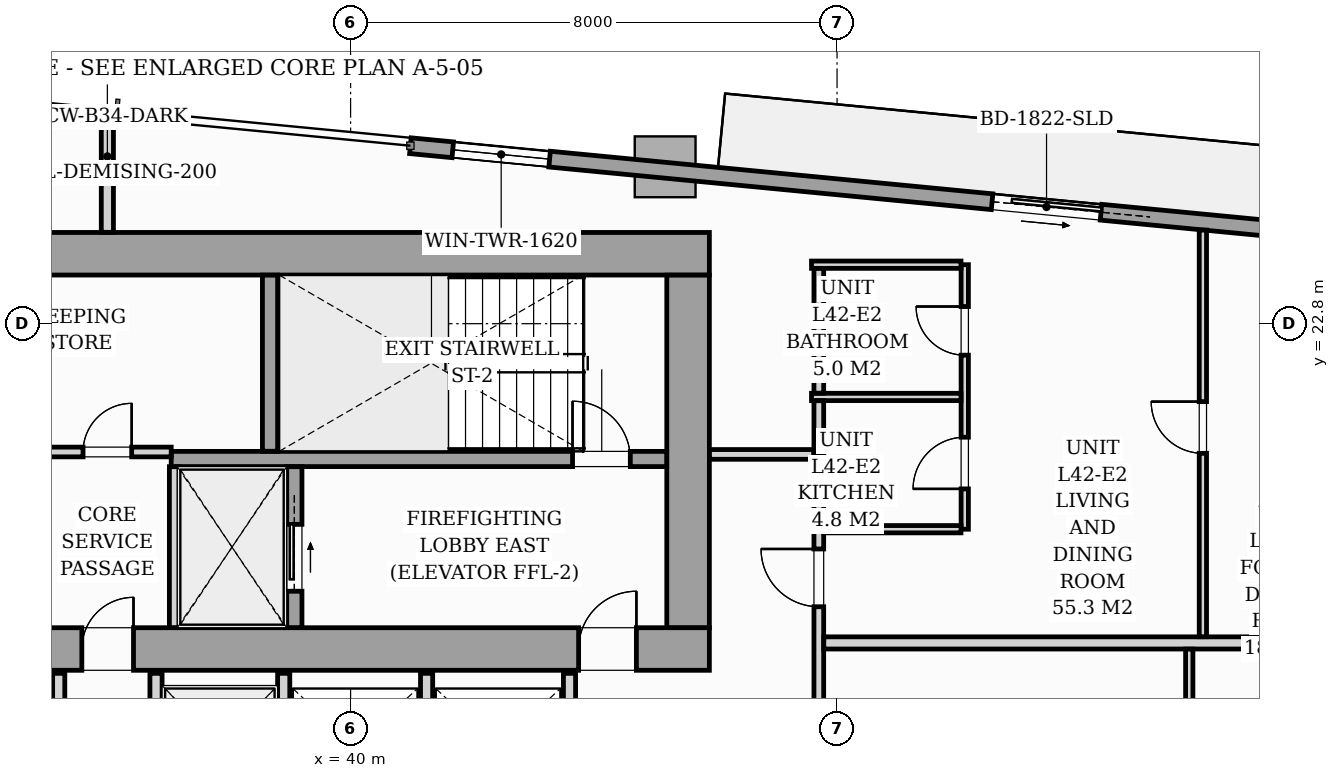
"""IFC4 building model, lengths in metres.
Left out: names, types, materials, properties, quantities, classifications, styles, units other than length and angle.
Written with IfcOpenShell. Run it as: python <this file> out.ifc"""

import sys

from ifc_helpers import new_model, si_unit, direction, frame, frame_2d, origin, origin_2d, place, context, subcontext, project, spatial, rectangle, i_section, extrude, source, transform, mapped, element, fill, save


model = new_model("IFC4")
c1 = context("Model", 3, precision=1e-05, world=origin(), true_north=direction((0.0, 1.0)))
c2 = subcontext(c1, "Body", "Model", "MODEL_VIEW")
j1 = project(units=[si_unit("LENGTHUNIT", "METRE"), si_unit("PLANEANGLEUNIT", "RADIAN")], contexts=[c1])
p1 = place(None, origin())
s1 = spatial("IfcSite", under=j1, at=p1, CompositionType="ELEMENT")
p2 = place(p1, origin())
s2 = spatial("IfcBuilding", under=s1, at=p2, CompositionType="ELEMENT")
p3 = place(p2, frame((0.0, 0.0, 147.0)))
s3 = spatial("IfcBuildingStorey", under=s2, at=p3, CompositionType="ELEMENT", Elevation=147.0)
m1 = source(origin(), c2, "Body", "SweptSolid", [
    extrude(i_section(OverallWidth=0.421, OverallDepth=0.465, WebThickness=0.045, FlangeThickness=0.073, FilletRadius=0.018, at=origin_2d()), origin(), (0.0, 0.0, 1.0), 3.196),
])
for number, where, z_axis, x_axis in (
    (1, (38.88, 17.4, 0.002), (0.0, 0.0, 1.0), (1.0, 0.0, 0.0)),
    (2, (45.6, 17.4, 0.002), (0.0, 0.0, 1.0), (1.0, 0.0, 0.0)),
    (3, (38.88, 24.0, 0.002), (0.0, 0.0, 1.0), (1.0, 0.0, 0.0)),
    (4, (45.6, 24.0, 0.002), (0.0, 0.0, 1.0), (1.0, 0.0, 0.0)),
):
    element("IfcColumn", number, at=place(p3, frame(where, z_axis=z_axis, x_axis=x_axis)), inside=s3, PredefinedType="PILASTER", context=c2, shape_type="MappedRepresentation", body=[
        mapped(m1, transform((0.0, 0.0, 0.0), scale=1.0)),
    ])
m2 = source(origin(), c2, "Body", "SweptSolid", [
    extrude(rectangle(XDim=1.0, YDim=1.0, at=origin_2d()), origin(), (0.0, 0.0, 1.0), 3.196),
])
p4 = place(p3, frame((45.173, 25.38, 0.002), z_axis=(0.0, 0.0, 1.0), x_axis=(0.995396198367, -0.09584575252, 0.0)))
e5 = element("IfcColumn", 5, at=p4, inside=s3, PredefinedType="COLUMN", context=c2, shape_type="MappedRepresentation", body=[
    mapped(m2, transform((0.0, 0.0, 0.0), scale=1.0)),
])
p5 = place(p3, frame((40.983, 25.727, 0.0), z_axis=(0.0, 0.0, 1.0), x_axis=(0.995395844771, -0.095849424686, 0.0)))
e6 = element("IfcWall", 6, at=p5, inside=s3, PredefinedType="STANDARD", context=c2, shape_type="SweptSolid", body=[
    extrude(rectangle(XDim=17.01, YDim=0.26, at=frame_2d((8.505, 0.0))), origin(), (0.0, 0.0, 1.0), 2.94),
])
p6 = place(p5, frame((9.61, 0.0, 0.0)))
e7 = element("IfcOpeningElement", 7, at=p6, cuts=e6, PredefinedType="OPENING", context=c2, shape_type="SweptSolid", body=[
    extrude(rectangle(XDim=1.8, YDim=2.06, at=frame_2d((0.9, 1.03))), frame((0.0, 0.14, 0.0), z_axis=(0.0, -1.0, 0.0), x_axis=(1.0, 0.0, 0.0)), (0.0, 0.0, 1.0), 0.28),
])
p7 = place(p5, frame((0.7, 0.0, 0.65)))
e8 = element("IfcOpeningElement", 8, at=p7, cuts=e6, PredefinedType="OPENING", context=c2, shape_type="SweptSolid", body=[
    extrude(rectangle(XDim=1.6, YDim=1.5, at=frame_2d((0.8, 0.75))), frame((0.0, 0.14, 0.0), z_axis=(0.0, -1.0, 0.0), x_axis=(1.0, 0.0, 0.0)), (0.0, 0.0, 1.0), 0.28),
])
p8 = place(p3, frame((26.1, 17.45, 0.0), z_axis=(0.0, 0.0, 1.0), x_axis=(1.0, 0.0, 0.0)))
e9 = element("IfcWall", 9, at=p8, inside=s3, PredefinedType="SHEAR", context=c2, shape_type="SweptSolid", body=[
    extrude(rectangle(XDim=19.8, YDim=0.7, at=frame_2d((9.9, 0.0))), origin(), (0.0, 0.0, 1.0), 3.2),
])
p9 = place(p8, frame((1.05, 0.0, 0.0)))
e10 = element("IfcOpeningElement", 10, at=p9, cuts=e9, PredefinedType="OPENING", context=c2, shape_type="SweptSolid", body=[
    extrude(rectangle(XDim=0.95, YDim=2.06, at=frame_2d((0.475, 1.03))), frame((0.0, 0.36, 0.0), z_axis=(0.0, -1.0, 0.0), x_axis=(1.0, 0.0, 0.0)), (0.0, 0.0, 1.0), 0.72),
])
p10 = place(p8, frame((9.48, 0.0, 0.0)))
e11 = element("IfcOpeningElement", 11, at=p10, cuts=e9, PredefinedType="OPENING", context=c2, shape_type="SweptSolid", body=[
    extrude(rectangle(XDim=0.85, YDim=2.0, at=frame_2d((0.425, 1.0))), frame((0.0, 0.36, 0.0), z_axis=(0.0, -1.0, 0.0), x_axis=(1.0, 0.0, 0.0)), (0.0, 0.0, 1.0), 0.72),
])
p11 = place(p8, frame((17.65, 0.0, 0.0)))
e12 = element("IfcOpeningElement", 12, at=p11, cuts=e9, PredefinedType="OPENING", context=c2, shape_type="SweptSolid", body=[
    extrude(rectangle(XDim=0.95, YDim=2.06, at=frame_2d((0.475, 1.03))), frame((0.0, 0.36, 0.0), z_axis=(0.0, -1.0, 0.0), x_axis=(1.0, 0.0, 0.0)), (0.0, 0.0, 1.0), 0.72),
])
p12 = place(p3, frame((26.1, 23.95, 0.0), z_axis=(0.0, 0.0, 1.0), x_axis=(1.0, 0.0, 0.0)))
e13 = element("IfcWall", 13, at=p12, inside=s3, PredefinedType="SHEAR", context=c2, shape_type="SweptSolid", body=[
    extrude(rectangle(XDim=19.8, YDim=0.7, at=frame_2d((9.9, 0.0))), origin(), (0.0, 0.0, 1.0), 3.2),
])
p13 = place(p3, frame((45.55, 17.802, 0.0), z_axis=(0.0, 0.0, 1.0), x_axis=(0.0, 1.0, 0.0)))
e14 = element("IfcWall", 14, at=p13, inside=s3, PredefinedType="SHEAR", context=c2, shape_type="SweptSolid", body=[
    extrude(rectangle(XDim=5.796, YDim=0.7, at=frame_2d((2.898, 0.0))), origin(), (0.0, 0.0, 1.0), 3.2),
])
p14 = place(p3, frame((37.05, 20.575, 0.0), z_axis=(0.0, 0.0, 1.0), x_axis=(1.0, 0.0, 0.0)))
e15 = element("IfcWall", 15, at=p14, inside=s3, PredefinedType="SOLIDWALL", context=c2, shape_type="SweptSolid", body=[
    extrude(rectangle(XDim=8.148, YDim=0.25, at=frame_2d((4.074, 0.0))), origin(), (0.0, 0.0, 1.0), 3.2),
])
p15 = place(p14, frame((6.6, 0.0, 0.0)))
e16 = element("IfcOpeningElement", 16, at=p15, cuts=e15, PredefinedType="OPENING", context=c2, shape_type="SweptSolid", body=[
    extrude(rectangle(XDim=0.95, YDim=2.06, at=frame_2d((0.475, 1.03))), frame((0.0, 0.135, 0.0), z_axis=(0.0, -1.0, 0.0), x_axis=(1.0, 0.0, 0.0)), (0.0, 0.0, 1.0), 0.27),
])
p16 = place(p3, frame((38.675, 20.702, 0.0), z_axis=(0.0, 0.0, 1.0), x_axis=(0.0, 1.0, 0.0)))
e17 = element("IfcWall", 17, at=p16, inside=s3, PredefinedType="SOLIDWALL", context=c2, shape_type="SweptSolid", body=[
    extrude(rectangle(XDim=2.896, YDim=0.25, at=frame_2d((1.448, 0.0))), origin(), (0.0, 0.0, 1.0), 3.2),
])
p17 = place(p3, frame((37.1, 17.802, 0.0), z_axis=(0.0, 0.0, 1.0), x_axis=(0.0, 1.0, 0.0)))
e18 = element("IfcWall", 18, at=p17, inside=s3, PredefinedType="PARTITIONING", context=c2, shape_type="SweptSolid", body=[
    extrude(rectangle(XDim=2.646, YDim=0.16, at=frame_2d((1.323, 0.0))), origin(), (0.0, 0.0, 1.0), 2.94),
])
p18 = place(p3, frame((39.075, 17.802, 0.0), z_axis=(0.0, 0.0, 1.0), x_axis=(0.0, 1.0, 0.0)))
e19 = element("IfcWall", 19, at=p18, inside=s3, PredefinedType="SOLIDWALL", context=c2, shape_type="SweptSolid", body=[
    extrude(rectangle(XDim=2.646, YDim=0.25, at=frame_2d((1.323, 0.0))), origin(), (0.0, 0.0, 1.0), 3.2),
])
p19 = place(p18, frame((0.598, 0.0, 0.0)))
e20 = element("IfcOpeningElement", 20, at=p19, cuts=e19, PredefinedType="OPENING", context=c2, shape_type="SweptSolid", body=[
    extrude(rectangle(XDim=1.1, YDim=2.08, at=frame_2d((0.55, 1.04))), frame((0.0, 0.135, 0.0), z_axis=(0.0, -1.0, 0.0), x_axis=(1.0, 0.0, 0.0)), (0.0, 0.0, 1.0), 0.27),
])
p20 = place(p3, frame((34.95, 20.69, 0.0), z_axis=(0.0, 0.0, 1.0), x_axis=(1.0, 0.0, 0.0)))
e21 = element("IfcWall", 21, at=p20, inside=s3, PredefinedType="PARTITIONING", context=c2, shape_type="SweptSolid", body=[
    extrude(rectangle(XDim=2.1, YDim=0.16, at=frame_2d((1.05, 0.0))), origin(), (0.0, 0.0, 1.0), 2.94),
])
p21 = place(p20, frame((0.65, 0.0, 0.0)))
e22 = element("IfcOpeningElement", 22, at=p21, cuts=e21, PredefinedType="OPENING", context=c2, shape_type="SweptSolid", body=[
    extrude(rectangle(XDim=0.8, YDim=2.05, at=frame_2d((0.4, 1.025))), frame((0.0, 0.09, 0.0), z_axis=(0.0, -1.0, 0.0), x_axis=(1.0, 0.0, 0.0)), (0.0, 0.0, 1.0), 0.18),
])
for number, where, z_axis, x_axis in (
    (23, (35.2, 14.75, 0.0), (0.0, 0.0, 1.0), (0.0, 1.0, 0.0)),
    (24, (36.8, 14.75, 0.0), (0.0, 0.0, 1.0), (0.0, 1.0, 0.0)),
    (25, (38.9, 14.75, 0.0), (0.0, 0.0, 1.0), (0.0, 1.0, 0.0)),
    (26, (41.25, 14.75, 0.0), (0.0, 0.0, 1.0), (0.0, 1.0, 0.0)),
    (27, (43.6, 14.75, 0.0), (0.0, 0.0, 1.0), (0.0, 1.0, 0.0)),
):
    element("IfcWall", number, at=place(p3, frame(where, z_axis=z_axis, x_axis=x_axis)), inside=s3, PredefinedType="PARTITIONING", context=c2, shape_type="SweptSolid", body=[
        extrude(rectangle(XDim=2.3, YDim=0.2, at=frame_2d((1.15, 0.0))), origin(), (0.0, 0.0, 1.0), 2.94),
    ])
p22 = place(p3, frame((47.7, 12.832, 0.0), z_axis=(0.0, 0.0, 1.0), x_axis=(0.0, 1.0, 0.0)))
e28 = element("IfcWall", 28, at=p22, inside=s3, PredefinedType="PARTITIONING", context=c2, shape_type="SweptSolid", body=[
    extrude(rectangle(XDim=7.818, YDim=0.16, at=frame_2d((3.909, 0.0))), origin(), (0.0, 0.0, 1.0), 2.94),
])
p23 = place(p22, frame((0.493, 0.0, 0.0)))
e29 = element("IfcOpeningElement", 29, at=p23, cuts=e28, PredefinedType="OPENING", context=c2, shape_type="SweptSolid", body=[
    extrude(rectangle(XDim=0.95, YDim=2.06, at=frame_2d((0.475, 1.03))), frame((0.0, 0.09, 0.0), z_axis=(0.0, -1.0, 0.0), x_axis=(1.0, 0.0, 0.0)), (0.0, 0.0, 1.0), 0.18),
])
p24 = place(p22, frame((5.313, 0.0, 0.0)))
e30 = element("IfcOpeningElement", 30, at=p24, cuts=e28, PredefinedType="OPENING", context=c2, shape_type="SweptSolid", body=[
    extrude(rectangle(XDim=0.95, YDim=2.06, at=frame_2d((0.475, 1.03))), frame((0.0, 0.09, 0.0), z_axis=(0.0, -1.0, 0.0), x_axis=(1.0, 0.0, 0.0)), (0.0, 0.0, 1.0), 0.18),
])
p25 = place(p3, frame((36.0, 24.302, 0.0), z_axis=(0.0, 0.0, 1.0), x_axis=(0.0, 1.0, 0.0)))
e31 = element("IfcWall", 31, at=p25, inside=s3, PredefinedType="PARTITIONING", context=c2, shape_type="SweptSolid", body=[
    extrude(rectangle(XDim=1.955, YDim=0.2, at=frame_2d((0.978, 0.0))), origin(), (0.0, 0.0, 1.0), 2.94),
])
p26 = place(p3, frame((45.902, 20.65, 0.0), z_axis=(0.0, 0.0, 1.0), x_axis=(1.0, 0.0, 0.0)))
e32 = element("IfcWall", 32, at=p26, inside=s3, PredefinedType="PARTITIONING", context=c2, shape_type="SweptSolid", body=[
    extrude(rectangle(XDim=1.716, YDim=0.16, at=frame_2d((0.858, 0.0))), origin(), (0.0, 0.0, 1.0), 2.94),
])
p27 = place(p3, frame((47.782, 17.55, 0.0), z_axis=(0.0, 0.0, 1.0), x_axis=(1.0, 0.0, 0.0)))
e33 = element("IfcWall", 33, at=p27, inside=s3, PredefinedType="PARTITIONING", context=c2, shape_type="SweptSolid", body=[
    extrude(rectangle(XDim=11.934, YDim=0.2, at=frame_2d((5.967, 0.0))), origin(), (0.0, 0.0, 1.0), 2.94),
])
p28 = place(p3, frame((53.792, 7.081, 0.0), z_axis=(0.0, 0.0, 1.0), x_axis=(0.0, 1.0, 0.0)))
e34 = element("IfcWall", 34, at=p28, inside=s3, PredefinedType="PARTITIONING", context=c2, shape_type="SweptSolid", body=[
    extrude(rectangle(XDim=10.367, YDim=0.12, at=frame_2d((5.184, 0.0))), origin(), (0.0, 0.0, 1.0), 2.94),
])
p29 = place(p28, frame((4.758, 0.0, 0.0)))
e35 = element("IfcOpeningElement", 35, at=p29, cuts=e34, PredefinedType="OPENING", context=c2, shape_type="SweptSolid", body=[
    extrude(rectangle(XDim=0.85, YDim=2.05, at=frame_2d((0.425, 1.025))), frame((0.0, 0.07, 0.0), z_axis=(0.0, -1.0, 0.0), x_axis=(1.0, 0.0, 0.0)), (0.0, 0.0, 1.0), 0.14),
])
p30 = place(p3, frame((50.1, 19.42, 0.0), z_axis=(0.0, 0.0, 1.0), x_axis=(0.0, 1.0, 0.0)))
e36 = element("IfcWall", 36, at=p30, inside=s3, PredefinedType="PARTITIONING", context=c2, shape_type="SweptSolid", body=[
    extrude(rectangle(XDim=4.35, YDim=0.12, at=frame_2d((2.175, 0.0))), origin(), (0.0, 0.0, 1.0), 2.94),
])
p31 = place(p30, frame((0.663, 0.0, 0.0)))
e37 = element("IfcOpeningElement", 37, at=p31, cuts=e36, PredefinedType="OPENING", context=c2, shape_type="SweptSolid", body=[
    extrude(rectangle(XDim=0.85, YDim=2.05, at=frame_2d((0.425, 1.025))), frame((0.0, 0.07, 0.0), z_axis=(0.0, -1.0, 0.0), x_axis=(1.0, 0.0, 0.0)), (0.0, 0.0, 1.0), 0.14),
])
p32 = place(p30, frame((2.862, 0.0, 0.0)))
e38 = element("IfcOpeningElement", 38, at=p32, cuts=e36, PredefinedType="OPENING", context=c2, shape_type="SweptSolid", body=[
    extrude(rectangle(XDim=0.8, YDim=2.02, at=frame_2d((0.4, 1.01))), frame((0.0, 0.07, 0.0), z_axis=(0.0, -1.0, 0.0), x_axis=(1.0, 0.0, 0.0)), (0.0, 0.0, 1.0), 0.14),
])
p33 = place(p3, frame((47.58, 21.595, 0.0), z_axis=(0.0, 0.0, 1.0), x_axis=(1.0, 0.0, 0.0)))
e39 = element("IfcWall", 39, at=p33, inside=s3, PredefinedType="PARTITIONING", context=c2, shape_type="SweptSolid", body=[
    extrude(rectangle(XDim=2.458, YDim=0.12, at=frame_2d((1.229, 0.0))), origin(), (0.0, 0.0, 1.0), 2.94),
])
p34 = place(p3, frame((47.782, 19.42, 0.0), z_axis=(0.0, 0.0, 1.0), x_axis=(1.0, 0.0, 0.0)))
e40 = element("IfcWall", 40, at=p34, inside=s3, PredefinedType="PARTITIONING", context=c2, shape_type="SweptSolid", body=[
    extrude(rectangle(XDim=2.256, YDim=0.12, at=frame_2d((1.128, 0.0))), origin(), (0.0, 0.0, 1.0), 2.94),
])
p35 = place(p3, frame((47.58, 23.77, 0.0), z_axis=(0.0, 0.0, 1.0), x_axis=(1.0, 0.0, 0.0)))
e41 = element("IfcWall", 41, at=p35, inside=s3, PredefinedType="PARTITIONING", context=c2, shape_type="SweptSolid", body=[
    extrude(rectangle(XDim=2.458, YDim=0.12, at=frame_2d((1.229, 0.0))), origin(), (0.0, 0.0, 1.0), 2.216),
])
p36 = place(p3, frame((47.7, 20.65, 0.0), z_axis=(0.0, 0.0, 1.0), x_axis=(0.0, 1.0, 0.0)))
e42 = element("IfcWall", 42, at=p36, inside=s3, PredefinedType="PARTITIONING", context=c2, shape_type="SweptSolid", body=[
    extrude(rectangle(XDim=0.883, YDim=0.16, at=frame_2d((0.441, 0.0))), origin(), (0.0, 0.0, 1.0), 2.94),
])
p37 = place(p3, frame((47.7, 21.657, 0.0), z_axis=(0.0, 0.0, 1.0), x_axis=(0.0, 1.0, 0.0)))
e43 = element("IfcWall", 43, at=p37, inside=s3, PredefinedType="PARTITIONING", context=c2, shape_type="SweptSolid", body=[
    extrude(rectangle(XDim=2.051, YDim=0.16, at=frame_2d((1.025, 0.0))), origin(), (0.0, 0.0, 1.0), 2.94),
])
p38 = place(p3, frame((54.016, 17.652, 0.0), z_axis=(0.0, 0.0, 1.0), x_axis=(0.0, 1.0, 0.0)))
e44 = element("IfcWall", 44, at=p38, inside=s3, PredefinedType="PARTITIONING", context=c2, shape_type="SweptSolid", body=[
    extrude(rectangle(XDim=6.687, YDim=0.12, at=frame_2d((3.344, 0.0))), origin(), (0.0, 0.0, 1.0), 2.94),
])
p39 = place(p38, frame((3.016, 0.0, 0.0)))
e45 = element("IfcOpeningElement", 45, at=p39, cuts=e44, PredefinedType="OPENING", context=c2, shape_type="SweptSolid", body=[
    extrude(rectangle(XDim=0.85, YDim=2.05, at=frame_2d((0.425, 1.025))), frame((0.0, 0.07, 0.0), z_axis=(0.0, -1.0, 0.0), x_axis=(1.0, 0.0, 0.0)), (0.0, 0.0, 1.0), 0.14),
])
m3 = source(origin(), c2, "Body", "SweptSolid", [
    extrude(rectangle(XDim=1.8, YDim=2.06, at=frame_2d((0.9, 1.03))), frame((0.0, 0.025, 0.0), z_axis=(0.0, -1.0, 0.0), x_axis=(1.0, 0.0, 0.0)), (0.0, 0.0, 1.0), 0.05),
])
p40 = place(p6, origin())
e46 = element("IfcDoor", 46, at=p40, inside=s3, OperationType="SLIDING_TO_RIGHT", PredefinedType="DOOR", context=c2, shape_type="MappedRepresentation", body=[
    mapped(m3, transform((0.0, 0.0, 0.0), scale=1.0)),
])
fill(e7, e46)
m4 = source(origin(), c2, "Body", "SweptSolid", [
    extrude(rectangle(XDim=1.6, YDim=1.5, at=frame_2d((0.8, 0.75))), frame((0.0, 0.03, 0.0), z_axis=(0.0, -1.0, 0.0), x_axis=(1.0, 0.0, 0.0)), (0.0, 0.0, 1.0), 0.06),
])
p41 = place(p7, origin())
e47 = element("IfcWindow", 47, at=p41, inside=s3, PartitioningType="SINGLE_PANEL", PredefinedType="WINDOW", context=c2, shape_type="MappedRepresentation", body=[
    mapped(m4, transform((0.0, 0.0, 0.0), scale=1.0)),
])
fill(e8, e47)
m5 = source(origin(), c2, "Body", "SweptSolid", [
    extrude(rectangle(XDim=0.85, YDim=2.0, at=frame_2d((0.425, 1.0))), frame((0.0, 0.025, 0.0), z_axis=(0.0, -1.0, 0.0), x_axis=(1.0, 0.0, 0.0)), (0.0, 0.0, 1.0), 0.05),
])
p42 = place(p10, origin())
e48 = element("IfcDoor", 48, at=p42, inside=s3, OperationType="SINGLE_SWING_RIGHT", PredefinedType="DOOR", context=c2, shape_type="MappedRepresentation", body=[
    mapped(m5, transform((0.0, 0.0, 0.0), scale=1.0)),
])
fill(e11, e48)
m6 = source(origin(), c2, "Body", "SweptSolid", [
    extrude(rectangle(XDim=0.95, YDim=2.06, at=frame_2d((0.475, 1.03))), frame((0.0, 0.025, 0.0), z_axis=(0.0, -1.0, 0.0), x_axis=(1.0, 0.0, 0.0)), (0.0, 0.0, 1.0), 0.05),
])
p43 = place(p11, origin())
e49 = element("IfcDoor", 49, at=p43, inside=s3, OperationType="SINGLE_SWING_RIGHT", PredefinedType="DOOR", context=c2, shape_type="MappedRepresentation", body=[
    mapped(m6, transform((0.0, 0.0, 0.0), scale=1.0)),
])
fill(e12, e49)
p44 = place(p15, origin())
e50 = element("IfcDoor", 50, at=p44, inside=s3, OperationType="SINGLE_SWING_LEFT", PredefinedType="DOOR", context=c2, shape_type="MappedRepresentation", body=[
    mapped(m6, transform((0.0, 0.0, 0.0), scale=1.0)),
])
fill(e16, e50)
m7 = source(origin(), c2, "Body", "SweptSolid", [
    extrude(rectangle(XDim=1.1, YDim=2.08, at=frame_2d((0.55, 1.04))), frame((0.0, 0.025, 0.0), z_axis=(0.0, -1.0, 0.0), x_axis=(1.0, 0.0, 0.0)), (0.0, 0.0, 1.0), 0.05),
])
p45 = place(p19, origin())
e51 = element("IfcDoor", 51, at=p45, inside=s3, OperationType="SLIDING_TO_RIGHT", PredefinedType="DOOR", context=c2, shape_type="MappedRepresentation", body=[
    mapped(m7, transform((0.0, 0.0, 0.0), scale=1.0)),
])
fill(e20, e51)
m8 = source(origin(), c2, "Body", "SweptSolid", [
    extrude(rectangle(XDim=0.8, YDim=2.05, at=frame_2d((0.4, 1.025))), frame((0.0, 0.025, 0.0), z_axis=(0.0, -1.0, 0.0), x_axis=(1.0, 0.0, 0.0)), (0.0, 0.0, 1.0), 0.05),
])
p46 = place(p21, origin())
e52 = element("IfcDoor", 52, at=p46, inside=s3, OperationType="SINGLE_SWING_RIGHT", PredefinedType="DOOR", context=c2, shape_type="MappedRepresentation", body=[
    mapped(m8, transform((0.0, 0.0, 0.0), scale=1.0)),
])
fill(e22, e52)
m9 = source(origin(), c2, "Body", "SweptSolid", [
    extrude(rectangle(XDim=0.95, YDim=2.06, at=frame_2d((0.475, 1.03))), frame((0.0, 0.025, 0.0), z_axis=(0.0, -1.0, 0.0), x_axis=(1.0, 0.0, 0.0)), (0.0, 0.0, 1.0), 0.05),
])
p47 = place(p24, origin())
e53 = element("IfcDoor", 53, at=p47, inside=s3, OperationType="SINGLE_SWING_RIGHT", PredefinedType="DOOR", context=c2, shape_type="MappedRepresentation", body=[
    mapped(m9, transform((0.0, 0.0, 0.0), scale=1.0)),
])
fill(e30, e53)
m10 = source(origin(), c2, "Body", "SweptSolid", [
    extrude(rectangle(XDim=0.85, YDim=2.05, at=frame_2d((0.425, 1.025))), frame((0.0, 0.025, 0.0), z_axis=(0.0, -1.0, 0.0), x_axis=(1.0, 0.0, 0.0)), (0.0, 0.0, 1.0), 0.05),
])
p48 = place(p31, origin())
e54 = element("IfcDoor", 54, at=p48, inside=s3, OperationType="SINGLE_SWING_LEFT", PredefinedType="DOOR", context=c2, shape_type="MappedRepresentation", body=[
    mapped(m10, transform((0.0, 0.0, 0.0), scale=1.0)),
])
fill(e37, e54)
m11 = source(origin(), c2, "Body", "SweptSolid", [
    extrude(rectangle(XDim=0.8, YDim=2.02, at=frame_2d((0.4, 1.01))), frame((0.0, 0.025, 0.0), z_axis=(0.0, -1.0, 0.0), x_axis=(1.0, 0.0, 0.0)), (0.0, 0.0, 1.0), 0.05),
])
p49 = place(p32, origin())
e55 = element("IfcDoor", 55, at=p49, inside=s3, OperationType="SINGLE_SWING_RIGHT", PredefinedType="DOOR", context=c2, shape_type="MappedRepresentation", body=[
    mapped(m11, transform((0.0, 0.0, 0.0), scale=1.0)),
])
fill(e38, e55)
p50 = place(p39, origin())
e56 = element("IfcDoor", 56, at=p50, inside=s3, OperationType="SINGLE_SWING_RIGHT", PredefinedType="DOOR", context=c2, shape_type="MappedRepresentation", body=[
    mapped(m10, transform((0.0, 0.0, 0.0), scale=1.0)),
])
fill(e45, e56)
save(model, sys.argv[1])
